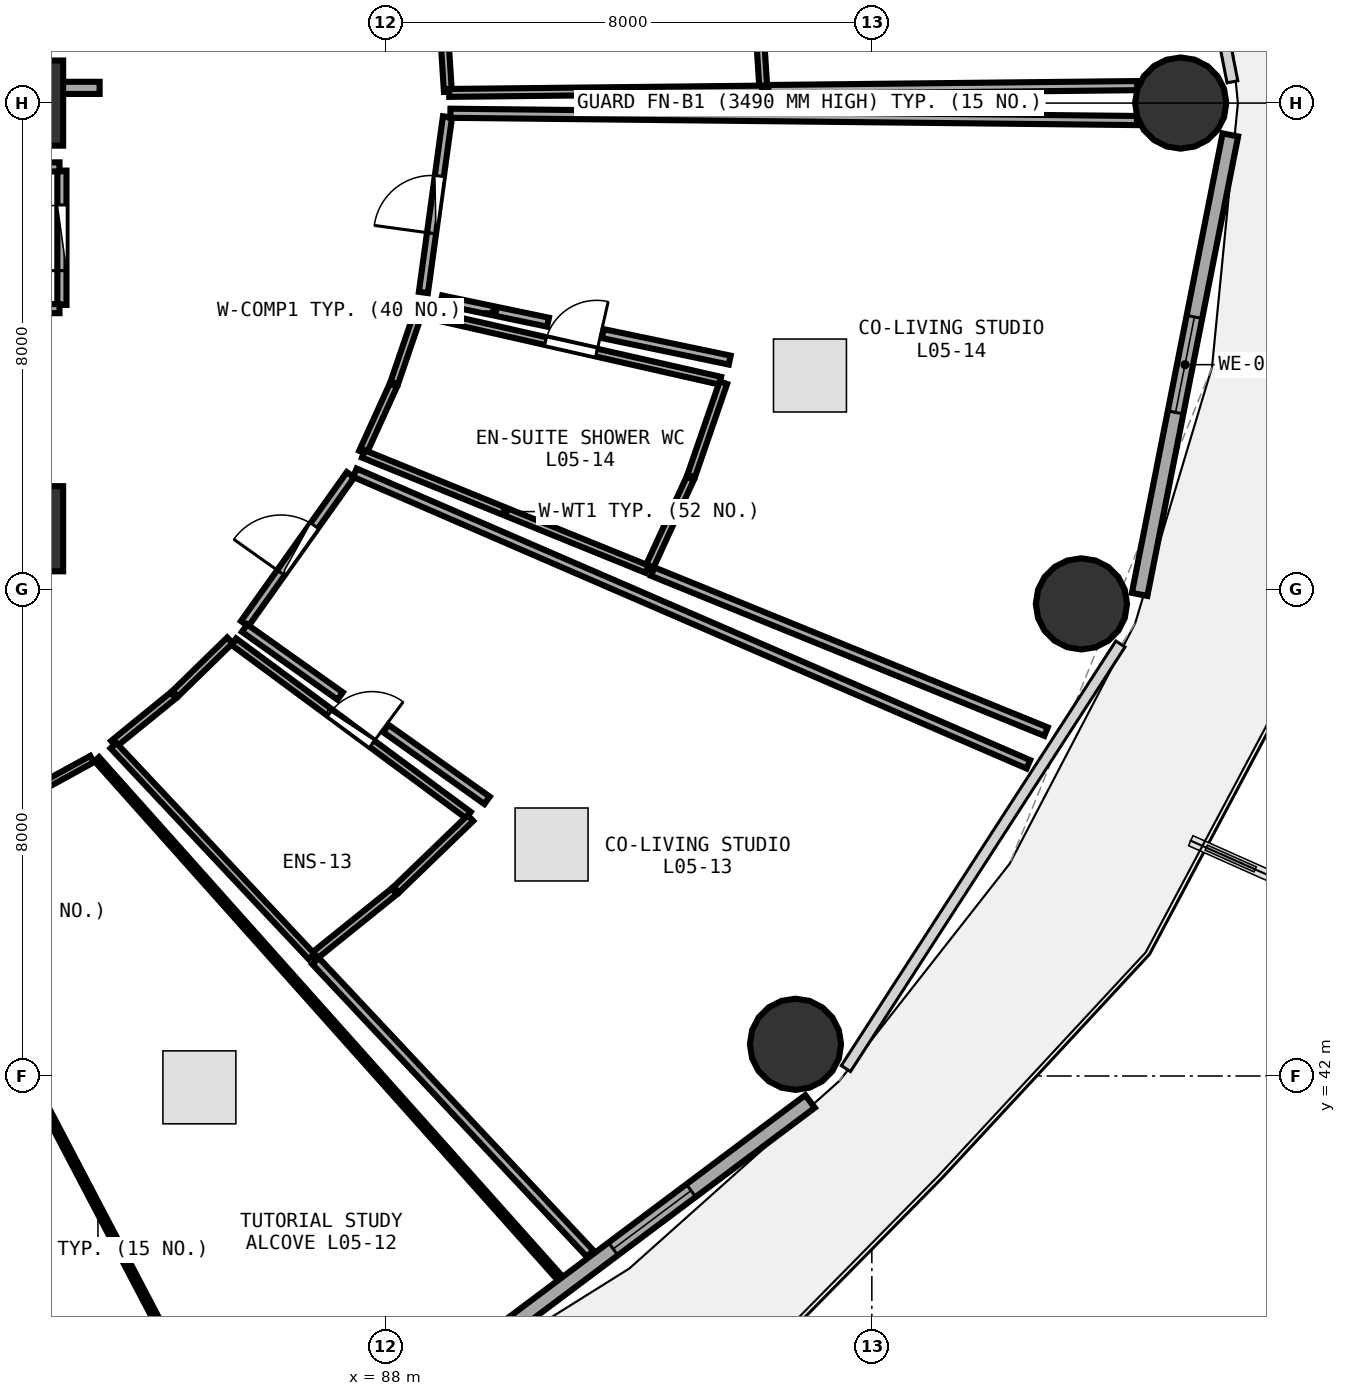
"""IFC4 building model, lengths in metres.
Left out: names, types, materials, properties, quantities, classifications, styles, units other than length and angle.
Written with IfcOpenShell. Run it as: python <this file> out.ifc"""

import sys

from ifc_helpers import new_model, si_unit, direction, frame, frame_2d, origin, origin_2d, place, context, subcontext, project, spatial, rectangle, circle, extrude, element, fill, save


model = new_model("IFC4")
c1 = context("Model", 3, precision=1e-05, world=origin(), true_north=direction((0.0, 1.0)))
c2 = subcontext(c1, "Body", "Model", "MODEL_VIEW")
j1 = project(units=[si_unit("LENGTHUNIT", "METRE"), si_unit("PLANEANGLEUNIT", "RADIAN")], contexts=[c1])
p1 = place(None, origin())
s1 = spatial("IfcSite", under=j1, at=p1, CompositionType="ELEMENT")
p2 = place(p1, origin())
s2 = spatial("IfcBuilding", under=s1, at=p2, CompositionType="ELEMENT")
p3 = place(p2, frame((0.0, 0.0, 22.5)))
s3 = spatial("IfcBuildingStorey", under=s2, at=p3, CompositionType="ELEMENT", Elevation=22.5)
for number, where, z_axis, x_axis in (
    (1, (82.0, 51.0, 0.0), (0.0, 0.0, 1.0), (1.0, 0.0, 0.0)),
    (2, (82.0, 58.0, 0.0), (0.0, 0.0, 1.0), (1.0, 0.0, 0.0)),
):
    element("IfcColumn", number, at=place(p3, frame(where, z_axis=z_axis, x_axis=x_axis)), inside=s3, PredefinedType="PILASTER", context=c2, shape_type="SweptSolid", body=[
        extrude(rectangle(XDim=1.4, YDim=1.4, at=origin_2d()), origin(), (0.0, 0.0, 1.0), 3.75),
    ])
for number, where, z_axis, x_axis in (
    (3, (101.08, 58.0, 0.0), (0.0, 0.0, 1.0), (1.0, 0.0, 0.0)),
    (4, (94.744, 42.522, 0.0), (0.0, 0.0, 1.0), (1.0, 0.0, 0.0)),
    (5, (99.447, 49.764, 0.0), (0.0, 0.0, 1.0), (1.0, 0.0, 0.0)),
):
    element("IfcColumn", number, at=place(p3, frame(where, z_axis=z_axis, x_axis=x_axis)), inside=s3, PredefinedType="COLUMN", context=c2, shape_type="SweptSolid", body=[
        extrude(circle(Radius=0.75, at=origin_2d()), origin(), (0.0, 0.0, 1.0), 3.75),
    ])
p4 = place(p3, frame((88.349, 36.611, 0.0), z_axis=(0.0, 0.0, 1.0), x_axis=(0.80030733173, 0.599590005569, 0.0)))
e6 = element("IfcWall", 6, at=p4, inside=s3, PredefinedType="SOLIDWALL", context=c2, shape_type="SweptSolid", body=[
    extrude(rectangle(XDim=8.291, YDim=0.26, at=frame_2d((4.145, 0.0))), origin(), (0.0, 0.0, 1.0), 3.475),
])
p5 = place(p4, frame((4.245, 0.0, 0.85)))
e7 = element("IfcOpeningElement", 7, at=p5, cuts=e6, PredefinedType="OPENING", context=c2, shape_type="SweptSolid", body=[
    extrude(rectangle(XDim=1.6, YDim=1.45, at=frame_2d((0.8, 0.725))), frame((0.0, 0.14, 0.0), z_axis=(0.0, -1.0, 0.0), x_axis=(1.0, 0.0, 0.0)), (0.0, 0.0, 1.0), 0.28),
])
p6 = place(p3, frame((100.404, 49.92, 0.0), z_axis=(0.0, 0.0, 1.0), x_axis=(0.193726159581, 0.98105564322, 0.0)))
e8 = element("IfcWall", 8, at=p6, inside=s3, PredefinedType="SOLIDWALL", context=c2, shape_type="SweptSolid", body=[
    extrude(rectangle(XDim=7.703, YDim=0.26, at=frame_2d((3.851, 0.0))), origin(), (0.0, 0.0, 1.0), 3.475),
])
p7 = place(p6, frame((3.051, 0.0, 0.85)))
e9 = element("IfcOpeningElement", 9, at=p7, cuts=e8, PredefinedType="OPENING", context=c2, shape_type="SweptSolid", body=[
    extrude(rectangle(XDim=1.6, YDim=1.45, at=frame_2d((0.8, 0.725))), frame((0.0, 0.14, 0.0), z_axis=(0.0, -1.0, 0.0), x_axis=(1.0, 0.0, 0.0)), (0.0, 0.0, 1.0), 0.28),
])
p8 = place(p3, frame((79.3, 58.25, 0.0), z_axis=(0.0, 0.0, 1.0), x_axis=(1.0, 0.0, 0.0)))
e10 = element("IfcWall", 10, at=p8, inside=s3, PredefinedType="SOLIDWALL", context=c2, shape_type="SweptSolid", body=[
    extrude(rectangle(XDim=4.0, YDim=0.2, at=frame_2d((2.0, 0.0))), origin(), (0.0, 0.0, 1.0), 2.775),
])
p9 = place(p8, frame((0.5, 0.0, 0.0)))
e11 = element("IfcOpeningElement", 11, at=p9, cuts=e10, PredefinedType="OPENING", context=c2, shape_type="SweptSolid", body=[
    extrude(rectangle(XDim=1.1, YDim=2.1, at=frame_2d((0.55, 1.05))), frame((0.0, 0.11, 0.0), z_axis=(0.0, -1.0, 0.0), x_axis=(1.0, 0.0, 0.0)), (0.0, 0.0, 1.0), 0.22),
])
p10 = place(p3, frame((82.68, 54.68, 0.0), z_axis=(0.0, 0.0, 1.0), x_axis=(0.0, 1.0, 0.0)))
e12 = element("IfcWall", 12, at=p10, inside=s3, PredefinedType="PARTITIONING", context=c2, shape_type="SweptSolid", body=[
    extrude(rectangle(XDim=2.21, YDim=0.15, at=frame_2d((1.105, 0.0))), origin(), (0.0, 0.0, 1.0), 3.48),
])
p11 = place(p10, frame((0.565, 0.0, 0.0)))
e13 = element("IfcOpeningElement", 13, at=p11, cuts=e12, PredefinedType="OPENING", context=c2, shape_type="SweptSolid", body=[
    extrude(rectangle(XDim=1.08, YDim=2.1, at=frame_2d((0.54, 1.05))), frame((0.0, 0.085, 0.0), z_axis=(0.0, -1.0, 0.0), x_axis=(1.0, 0.0, 0.0)), (0.0, 0.0, 1.0), 0.17),
])
p12 = place(p3, frame((80.299, 45.632, 0.0), z_axis=(0.0, 0.0, 1.0), x_axis=(0.876387079092, 0.481607399861, 0.0)))
e14 = element("IfcWall", 14, at=p12, inside=s3, PredefinedType="PARTITIONING", context=c2, shape_type="SweptSolid", body=[
    extrude(rectangle(XDim=3.281, YDim=0.12, at=frame_2d((1.641, 0.0))), origin(), (0.0, 0.0, 1.0), 2.875),
])
p13 = place(p12, frame((1.191, 0.0, 0.0)))
e15 = element("IfcOpeningElement", 15, at=p13, cuts=e14, PredefinedType="OPENING", context=c2, shape_type="SweptSolid", body=[
    extrude(rectangle(XDim=0.9, YDim=2.08, at=frame_2d((0.45, 1.04))), frame((0.0, 0.07, 0.0), z_axis=(0.0, -1.0, 0.0), x_axis=(1.0, 0.0, 0.0)), (0.0, 0.0, 1.0), 0.14),
])
p14 = place(p3, frame((85.506, 49.143, 0.0), z_axis=(0.0, 0.0, 1.0), x_axis=(0.80412644244, -0.594458295063, 0.0)))
e16 = element("IfcWall", 16, at=p14, inside=s3, PredefinedType="PLUMBINGWALL", context=c2, shape_type="SweptSolid", body=[
    extrude(rectangle(XDim=4.799, YDim=0.13, at=frame_2d((2.399, 0.0))), origin(), (0.0, 0.0, 1.0), 2.875),
])
p15 = place(p14, frame((1.969, 0.0, 0.0)))
e17 = element("IfcOpeningElement", 17, at=p15, cuts=e16, PredefinedType="OPENING", context=c2, shape_type="SweptSolid", body=[
    extrude(rectangle(XDim=0.86, YDim=2.05, at=frame_2d((0.43, 1.025))), frame((0.0, 0.075, 0.0), z_axis=(0.0, -1.0, 0.0), x_axis=(1.0, 0.0, 0.0)), (0.0, 0.0, 1.0), 0.15),
])
p16 = place(p3, frame((85.686, 49.438, 0.0), z_axis=(0.0, 0.0, 1.0), x_axis=(0.579107689823, 0.815251055557, 0.0)))
e18 = element("IfcWall", 18, at=p16, inside=s3, PredefinedType="PARTITIONING", context=c2, shape_type="SweptSolid", body=[
    extrude(rectangle(XDim=3.005, YDim=0.15, at=frame_2d((1.503, 0.0))), origin(), (0.0, 0.0, 1.0), 2.875),
])
p17 = place(p16, frame((1.028, 0.0, 0.0)))
e19 = element("IfcOpeningElement", 19, at=p17, cuts=e18, PredefinedType="OPENING", context=c2, shape_type="SweptSolid", body=[
    extrude(rectangle(XDim=0.95, YDim=2.08, at=frame_2d((0.475, 1.04))), frame((0.0, 0.085, 0.0), z_axis=(0.0, -1.0, 0.0), x_axis=(1.0, 0.0, 0.0)), (0.0, 0.0, 1.0), 0.17),
])
p18 = place(p3, frame((88.603, 54.548, 0.0), z_axis=(0.0, 0.0, 1.0), x_axis=(0.975187669184, -0.221379786503, 0.0)))
e20 = element("IfcWall", 20, at=p18, inside=s3, PredefinedType="PLUMBINGWALL", context=c2, shape_type="SweptSolid", body=[
    extrude(rectangle(XDim=5.029, YDim=0.13, at=frame_2d((2.514, 0.0))), origin(), (0.0, 0.0, 1.0), 3.175),
])
p19 = place(p18, frame((2.084, 0.0, 0.0)))
e21 = element("IfcOpeningElement", 21, at=p19, cuts=e20, PredefinedType="OPENING", context=c2, shape_type="SweptSolid", body=[
    extrude(rectangle(XDim=0.86, YDim=2.05, at=frame_2d((0.43, 1.025))), frame((0.0, 0.075, 0.0), z_axis=(0.0, -1.0, 0.0), x_axis=(1.0, 0.0, 0.0)), (0.0, 0.0, 1.0), 0.15),
])
p20 = place(p3, frame((88.625, 54.885, 0.0), z_axis=(0.0, 0.0, 1.0), x_axis=(0.135838186105, 0.990731036758, 0.0)))
e22 = element("IfcWall", 22, at=p20, inside=s3, PredefinedType="PARTITIONING", context=c2, shape_type="SweptSolid", body=[
    extrude(rectangle(XDim=2.915, YDim=0.15, at=frame_2d((1.458, 0.0))), origin(), (0.0, 0.0, 1.0), 3.48),
])
p21 = place(p20, frame((0.983, 0.0, 0.0)))
e23 = element("IfcOpeningElement", 23, at=p21, cuts=e22, PredefinedType="OPENING", context=c2, shape_type="SweptSolid", body=[
    extrude(rectangle(XDim=0.95, YDim=2.08, at=frame_2d((0.475, 1.04))), frame((0.0, 0.085, 0.0), z_axis=(0.0, -1.0, 0.0), x_axis=(1.0, 0.0, 0.0)), (0.0, 0.0, 1.0), 0.17),
])
p22 = place(p3, frame((81.9, 54.62, 0.0), z_axis=(0.0, 0.0, 1.0), x_axis=(1.0, 0.0, 0.0)))
e24 = element("IfcWall", 24, at=p22, inside=s3, PredefinedType="PARTITIONING", context=c2, shape_type="SweptSolid", body=[
    extrude(rectangle(XDim=0.74, YDim=0.15, at=frame_2d((0.37, 0.0))), origin(), (0.0, 0.0, 1.0), 2.775),
])
p23 = place(p3, frame((82.64, 56.95, 0.0), z_axis=(0.0, 0.0, 1.0), x_axis=(-1.0, 0.0, 0.0)))
e25 = element("IfcWall", 25, at=p23, inside=s3, PredefinedType="PARTITIONING", context=c2, shape_type="SweptSolid", body=[
    extrude(rectangle(XDim=1.55, YDim=0.15, at=frame_2d((0.775, 0.0))), origin(), (0.0, 0.0, 1.0), 2.775),
])
p24 = place(p3, frame((89.028, 58.187, 0.0), z_axis=(0.0, 0.0, 1.0), x_axis=(-0.063661240763, 0.99797156594, 0.0)))
e26 = element("IfcWall", 26, at=p24, inside=s3, PredefinedType="PLUMBINGWALL", context=c2, shape_type="SweptSolid", body=[
    extrude(rectangle(XDim=1.197, YDim=0.13, at=frame_2d((0.598, 0.0))), origin(), (0.0, 0.0, 1.0), 2.875),
])
p25 = place(p3, frame((94.113, 59.845, 0.0), z_axis=(0.0, 0.0, 1.0), x_axis=(0.06383542257, -0.997960439509, 0.0)))
e27 = element("IfcWall", 27, at=p25, inside=s3, PredefinedType="PLUMBINGWALL", context=c2, shape_type="SweptSolid", body=[
    extrude(rectangle(XDim=1.606, YDim=0.13, at=frame_2d((0.803, 0.0))), origin(), (0.0, 0.0, 1.0), 3.48),
])
p26 = place(p3, frame((94.197, 58.222, 0.0), z_axis=(0.0, 0.0, 1.0), x_axis=(-0.999944081579, -0.010575146078, 0.0)))
e28 = element("IfcWall", 28, at=p26, inside=s3, PredefinedType="PLUMBINGWALL", context=c2, shape_type="SweptSolid", body=[
    extrude(rectangle(XDim=5.148, YDim=0.13, at=frame_2d((2.574, 0.0))), origin(), (0.0, 0.0, 1.0), 2.875),
])
p27 = place(p3, frame((100.36, 58.287, 0.0), z_axis=(0.0, 0.0, 1.0), x_axis=(-0.999943071294, -0.010670246996, 0.0)))
e29 = element("IfcWall", 29, at=p27, inside=s3, PredefinedType="PARTITIONING", context=c2, shape_type="SweptSolid", body=[
    extrude(rectangle(XDim=6.063, YDim=0.15, at=frame_2d((3.032, 0.0))), origin(), (0.0, 0.0, 1.0), 3.235),
])
p28 = place(p3, frame((83.254, 47.211, 0.0), z_axis=(0.0, 0.0, 1.0), x_axis=(0.66580890104, -0.746122313897, 0.0)))
e30 = element("IfcWall", 30, at=p28, inside=s3, PredefinedType="PARTITIONING", context=c2, shape_type="SweptSolid", body=[
    extrude(rectangle(XDim=11.399, YDim=0.1, at=frame_2d((5.7, 0.0))), origin(), (0.0, 0.0, 1.0), 2.875),
])
p29 = place(p3, frame((85.401, 35.769, 0.0), z_axis=(0.0, 0.0, 1.0), x_axis=(-0.464308397246, 0.885673592384, 0.0)))
e31 = element("IfcWall", 31, at=p29, inside=s3, PredefinedType="PARTITIONING", context=c2, shape_type="SweptSolid", body=[
    extrude(rectangle(XDim=9.17, YDim=0.1, at=frame_2d((4.585, 0.0))), origin(), (0.0, 0.0, 1.0), 2.875),
])
p30 = place(p3, frame((83.53, 47.461, 0.0), z_axis=(0.0, 0.0, 1.0), x_axis=(0.77596084644, 0.63078107517, 0.0)))
e32 = element("IfcWall", 32, at=p30, inside=s3, PredefinedType="PLUMBINGWALL", context=c2, shape_type="SweptSolid", body=[
    extrude(rectangle(XDim=1.268, YDim=0.13, at=frame_2d((0.634, 0.0))), origin(), (0.0, 0.0, 1.0), 2.875),
])
p31 = place(p3, frame((84.543, 48.287, 0.0), z_axis=(0.0, 0.0, 1.0), x_axis=(0.715980731769, 0.698120041064, 0.0)))
e33 = element("IfcWall", 33, at=p31, inside=s3, PredefinedType="PLUMBINGWALL", context=c2, shape_type="SweptSolid", body=[
    extrude(rectangle(XDim=1.258, YDim=0.13, at=frame_2d((0.629, 0.0))), origin(), (0.0, 0.0, 1.0), 2.875),
])
p32 = place(p3, frame((89.399, 46.241, 0.0), z_axis=(0.0, 0.0, 1.0), x_axis=(-0.719664402118, -0.694322078234, 0.0)))
e34 = element("IfcWall", 34, at=p32, inside=s3, PredefinedType="PLUMBINGWALL", context=c2, shape_type="SweptSolid", body=[
    extrude(rectangle(XDim=1.696, YDim=0.13, at=frame_2d((0.848, 0.0))), origin(), (0.0, 0.0, 1.0), 2.875),
])
p33 = place(p3, frame((88.148, 45.038, 0.0), z_axis=(0.0, 0.0, 1.0), x_axis=(-0.778806140639, -0.627264693174, 0.0)))
e35 = element("IfcWall", 35, at=p33, inside=s3, PredefinedType="PLUMBINGWALL", context=c2, shape_type="SweptSolid", body=[
    extrude(rectangle(XDim=1.713, YDim=0.13, at=frame_2d((0.856, 0.0))), origin(), (0.0, 0.0, 1.0), 3.175),
])
p34 = place(p3, frame((86.785, 43.966, 0.0), z_axis=(0.0, 0.0, 1.0), x_axis=(-0.68469858897, 0.728826345753, 0.0)))
e36 = element("IfcWall", 36, at=p34, inside=s3, PredefinedType="PLUMBINGWALL", context=c2, shape_type="SweptSolid", body=[
    extrude(rectangle(XDim=4.758, YDim=0.13, at=frame_2d((2.379, 0.0))), origin(), (0.0, 0.0, 1.0), 2.875),
])
p35 = place(p3, frame((87.498, 51.921, 0.0), z_axis=(0.0, 0.0, 1.0), x_axis=(0.917695041134, -0.397285554077, 0.0)))
e37 = element("IfcWall", 37, at=p35, inside=s3, PredefinedType="PARTITIONING", context=c2, shape_type="SweptSolid", body=[
    extrude(rectangle(XDim=12.07, YDim=0.15, at=frame_2d((6.035, 0.0))), origin(), (0.0, 0.0, 1.0), 2.875),
])
p36 = place(p3, frame((91.368, 39.078, 0.0), z_axis=(0.0, 0.0, 1.0), x_axis=(-0.684296653493, 0.729203736975, 0.0)))
e38 = element("IfcWall", 38, at=p36, inside=s3, PredefinedType="PARTITIONING", context=c2, shape_type="SweptSolid", body=[
    extrude(rectangle(XDim=6.6, YDim=0.15, at=frame_2d((3.3, 0.0))), origin(), (0.0, 0.0, 1.0), 2.875),
])
p37 = place(p3, frame((89.671, 46.533, 0.0), z_axis=(0.0, 0.0, 1.0), x_axis=(-0.815281399299, 0.579064970411, 0.0)))
e39 = element("IfcWall", 39, at=p37, inside=s3, PredefinedType="PARTITIONING", context=c2, shape_type="SweptSolid", body=[
    extrude(rectangle(XDim=2.042, YDim=0.15, at=frame_2d((1.021, 0.0))), origin(), (0.0, 0.0, 1.0), 3.48),
])
p38 = place(p3, frame((87.256, 48.249, 0.0), z_axis=(0.0, 0.0, 1.0), x_axis=(-0.815270043711, 0.579080957922, 0.0)))
e40 = element("IfcWall", 40, at=p38, inside=s3, PredefinedType="PARTITIONING", context=c2, shape_type="SweptSolid", body=[
    extrude(rectangle(XDim=1.929, YDim=0.15, at=frame_2d((0.964, 0.0))), origin(), (0.0, 0.0, 1.0), 3.235),
])
p39 = place(p3, frame((87.628, 52.255, 0.0), z_axis=(0.0, 0.0, 1.0), x_axis=(0.4138937247, 0.910325208183, 0.0)))
e41 = element("IfcWall", 41, at=p39, inside=s3, PredefinedType="PLUMBINGWALL", context=c2, shape_type="SweptSolid", body=[
    extrude(rectangle(XDim=1.216, YDim=0.13, at=frame_2d((0.608, 0.0))), origin(), (0.0, 0.0, 1.0), 3.48),
])
p40 = place(p3, frame((88.146, 53.399, 0.0), z_axis=(0.0, 0.0, 1.0), x_axis=(0.323735286305, 0.946147696928, 0.0)))
e42 = element("IfcWall", 42, at=p40, inside=s3, PredefinedType="PLUMBINGWALL", context=c2, shape_type="SweptSolid", body=[
    extrude(rectangle(XDim=1.208, YDim=0.13, at=frame_2d((0.604, 0.0))), origin(), (0.0, 0.0, 1.0), 3.48),
])
p41 = place(p3, frame((93.559, 53.402, 0.0), z_axis=(0.0, 0.0, 1.0), x_axis=(-0.326356647952, -0.945246707657, 0.0)))
e43 = element("IfcWall", 43, at=p41, inside=s3, PredefinedType="PLUMBINGWALL", context=c2, shape_type="SweptSolid", body=[
    extrude(rectangle(XDim=1.624, YDim=0.13, at=frame_2d((0.812, 0.0))), origin(), (0.0, 0.0, 1.0), 3.48),
])
p42 = place(p3, frame((93.014, 51.83, 0.0), z_axis=(0.0, 0.0, 1.0), x_axis=(-0.41762687648, -0.908618617486, 0.0)))
e44 = element("IfcWall", 44, at=p42, inside=s3, PredefinedType="PLUMBINGWALL", context=c2, shape_type="SweptSolid", body=[
    extrude(rectangle(XDim=1.634, YDim=0.13, at=frame_2d((0.817, 0.0))), origin(), (0.0, 0.0, 1.0), 2.875),
])
p43 = place(p3, frame((92.304, 50.334, 0.0), z_axis=(0.0, 0.0, 1.0), x_axis=(-0.926504606816, 0.376283421835, 0.0)))
e45 = element("IfcWall", 45, at=p43, inside=s3, PredefinedType="PLUMBINGWALL", context=c2, shape_type="SweptSolid", body=[
    extrude(rectangle(XDim=5.036, YDim=0.13, at=frame_2d((2.518, 0.0))), origin(), (0.0, 0.0, 1.0), 2.875),
])
p44 = place(p3, frame((89.069, 57.833, 0.0), z_axis=(0.0, 0.0, 1.0), x_axis=(0.999943877154, -0.010594458135, 0.0)))
e46 = element("IfcWall", 46, at=p44, inside=s3, PredefinedType="PARTITIONING", context=c2, shape_type="SweptSolid", body=[
    extrude(rectangle(XDim=11.292, YDim=0.15, at=frame_2d((5.646, 0.0))), origin(), (0.0, 0.0, 1.0), 2.875),
])
p45 = place(p3, frame((98.865, 47.664, 0.0), z_axis=(0.0, 0.0, 1.0), x_axis=(-0.926325178802, 0.376724917038, 0.0)))
e47 = element("IfcWall", 47, at=p45, inside=s3, PredefinedType="PARTITIONING", context=c2, shape_type="SweptSolid", body=[
    extrude(rectangle(XDim=6.983, YDim=0.15, at=frame_2d((3.492, 0.0))), origin(), (0.0, 0.0, 1.0), 2.875),
])
p46 = place(p3, frame((93.663, 53.773, 0.0), z_axis=(0.0, 0.0, 1.0), x_axis=(-0.978922282622, 0.204233113343, 0.0)))
e48 = element("IfcWall", 48, at=p46, inside=s3, PredefinedType="PARTITIONING", context=c2, shape_type="SweptSolid", body=[
    extrude(rectangle(XDim=2.133, YDim=0.15, at=frame_2d((1.066, 0.0))), origin(), (0.0, 0.0, 1.0), 3.175),
])
p47 = place(p3, frame((90.675, 54.397, 0.0), z_axis=(0.0, 0.0, 1.0), x_axis=(-0.978929424395, 0.204198878681, 0.0)))
e49 = element("IfcWall", 49, at=p47, inside=s3, PredefinedType="PARTITIONING", context=c2, shape_type="SweptSolid", body=[
    extrude(rectangle(XDim=1.793, YDim=0.15, at=frame_2d((0.897, 0.0))), origin(), (0.0, 0.0, 1.0), 3.235),
])
p48 = place(p5, origin())
e50 = element("IfcWindow", 50, at=p48, inside=s3, PartitioningType="SINGLE_PANEL", PredefinedType="WINDOW", context=c2, shape_type="SweptSolid", body=[
    extrude(rectangle(XDim=1.6, YDim=1.45, at=frame_2d((0.8, 0.725))), frame((0.0, 0.03, 0.0), z_axis=(0.0, -1.0, 0.0), x_axis=(1.0, 0.0, 0.0)), (0.0, 0.0, 1.0), 0.06),
])
fill(e7, e50)
p49 = place(p7, origin())
e51 = element("IfcWindow", 51, at=p49, inside=s3, PartitioningType="SINGLE_PANEL", PredefinedType="WINDOW", context=c2, shape_type="SweptSolid", body=[
    extrude(rectangle(XDim=1.6, YDim=1.45, at=frame_2d((0.8, 0.725))), frame((0.0, 0.03, 0.0), z_axis=(0.0, -1.0, 0.0), x_axis=(1.0, 0.0, 0.0)), (0.0, 0.0, 1.0), 0.06),
])
fill(e9, e51)
p50 = place(p11, origin())
e52 = element("IfcDoor", 52, at=p50, inside=s3, OperationType="SINGLE_SWING_LEFT", PredefinedType="DOOR", context=c2, shape_type="SweptSolid", body=[
    extrude(rectangle(XDim=1.08, YDim=2.1, at=frame_2d((0.54, 1.05))), frame((0.0, 0.025, 0.0), z_axis=(0.0, -1.0, 0.0), x_axis=(1.0, 0.0, 0.0)), (0.0, 0.0, 1.0), 0.05),
])
fill(e13, e52)
p51 = place(p15, origin())
e53 = element("IfcDoor", 53, at=p51, inside=s3, OperationType="SINGLE_SWING_RIGHT", PredefinedType="DOOR", context=c2, shape_type="SweptSolid", body=[
    extrude(rectangle(XDim=0.86, YDim=2.05, at=frame_2d((0.43, 1.025))), frame((0.0, 0.025, 0.0), z_axis=(0.0, -1.0, 0.0), x_axis=(1.0, 0.0, 0.0)), (0.0, 0.0, 1.0), 0.05),
])
fill(e17, e53)
p52 = place(p17, origin())
e54 = element("IfcDoor", 54, at=p52, inside=s3, OperationType="SINGLE_SWING_LEFT", PredefinedType="DOOR", context=c2, shape_type="SweptSolid", body=[
    extrude(rectangle(XDim=0.95, YDim=2.08, at=frame_2d((0.475, 1.04))), frame((0.0, 0.025, 0.0), z_axis=(0.0, -1.0, 0.0), x_axis=(1.0, 0.0, 0.0)), (0.0, 0.0, 1.0), 0.05),
])
fill(e19, e54)
p53 = place(p19, origin())
e55 = element("IfcDoor", 55, at=p53, inside=s3, OperationType="SINGLE_SWING_RIGHT", PredefinedType="DOOR", context=c2, shape_type="SweptSolid", body=[
    extrude(rectangle(XDim=0.86, YDim=2.05, at=frame_2d((0.43, 1.025))), frame((0.0, 0.025, 0.0), z_axis=(0.0, -1.0, 0.0), x_axis=(1.0, 0.0, 0.0)), (0.0, 0.0, 1.0), 0.05),
])
fill(e21, e55)
p54 = place(p21, origin())
e56 = element("IfcDoor", 56, at=p54, inside=s3, OperationType="SINGLE_SWING_LEFT", PredefinedType="DOOR", context=c2, shape_type="SweptSolid", body=[
    extrude(rectangle(XDim=0.95, YDim=2.08, at=frame_2d((0.475, 1.04))), frame((0.0, 0.025, 0.0), z_axis=(0.0, -1.0, 0.0), x_axis=(1.0, 0.0, 0.0)), (0.0, 0.0, 1.0), 0.05),
])
fill(e23, e56)
save(model, sys.argv[1])
